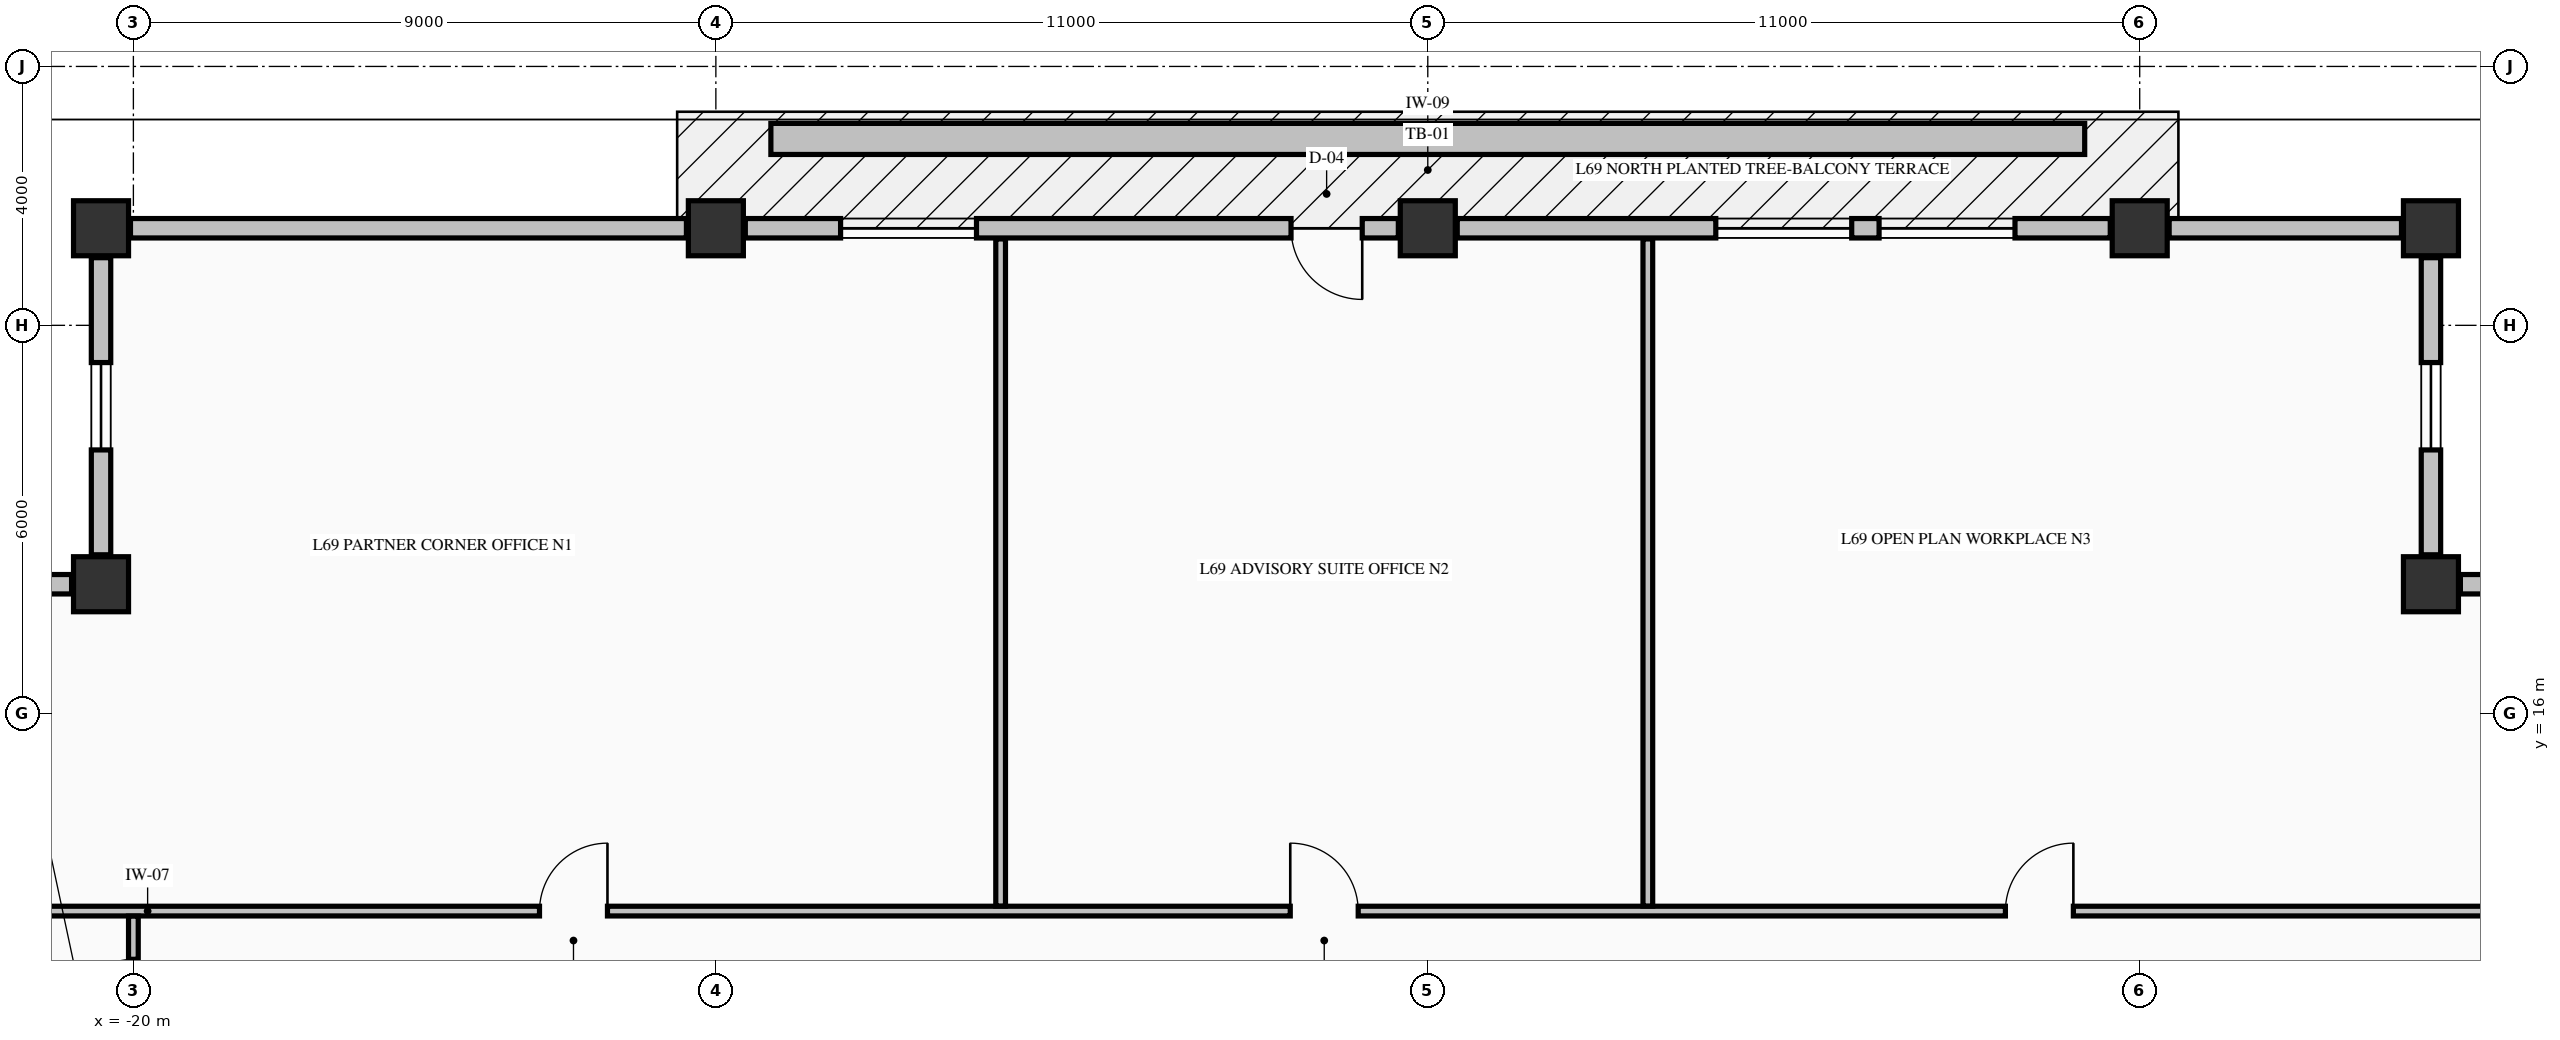
"""IFC4 building model, lengths in metres.
Left out: names, types, materials, properties, quantities, classifications, styles, units other than length and angle.
Written with IfcOpenShell. Run it as: python <this file> out.ifc"""

import sys

from ifc_helpers import new_model, si_unit, direction, frame, frame_2d, origin, origin_2d, place, context, subcontext, project, spatial, rectangle, extrude, element, fill, save


model = new_model("IFC4")
c1 = context("Model", 3, precision=1e-05, world=origin(), true_north=direction((0.0, 1.0)))
c2 = subcontext(c1, "Body", "Model", "MODEL_VIEW")
j1 = project(units=[si_unit("LENGTHUNIT", "METRE"), si_unit("PLANEANGLEUNIT", "RADIAN")], contexts=[c1])
p1 = place(None, origin())
s1 = spatial("IfcSite", under=j1, at=p1, CompositionType="ELEMENT")
p2 = place(p1, origin())
s2 = spatial("IfcBuilding", under=s1, at=p2, CompositionType="ELEMENT")
p3 = place(p2, frame((0.0, 0.0, 260.89)))
s3 = spatial("IfcBuildingStorey", under=s2, at=p3, CompositionType="ELEMENT", Elevation=260.89)
for number, where, z_axis, x_axis in (
    (1, (-20.5, 23.5, -0.25), (0.0, 0.0, 1.0), (1.0, 0.0, 0.0)),
    (2, (-11.0, 23.5, -0.25), (0.0, 0.0, 1.0), (1.0, 0.0, 0.0)),
    (3, (0.0, 23.5, -0.25), (0.0, 0.0, 1.0), (1.0, 0.0, 0.0)),
    (4, (11.0, 23.5, -0.25), (0.0, 0.0, 1.0), (1.0, 0.0, 0.0)),
    (5, (15.5, 23.5, -0.25), (0.0, 0.0, 1.0), (1.0, 0.0, 0.0)),
    (6, (15.5, 18.0, -0.25), (0.0, 0.0, 1.0), (1.0, 0.0, 0.0)),
    (7, (-20.5, 18.0, -0.25), (0.0, 0.0, 1.0), (1.0, 0.0, 0.0)),
):
    element("IfcColumn", number, at=place(p3, frame(where, z_axis=z_axis, x_axis=x_axis)), inside=s3, PredefinedType="COLUMN", context=c2, shape_type="SweptSolid", body=[
        extrude(rectangle(XDim=0.85, YDim=0.85, at=origin_2d()), origin(), (0.0, 0.0, 1.0), 3.23),
    ])
p4 = place(p3, frame((20.545, 18.0, 0.0), z_axis=(0.0, 0.0, 1.0), x_axis=(-1.0, 0.0, 0.0)))
e8 = element("IfcWall", 8, at=p4, inside=s3, PredefinedType="STANDARD", context=c2, shape_type="SweptSolid", body=[
    extrude(rectangle(XDim=4.59, YDim=0.3, at=frame_2d((2.295, 0.0))), origin(), (0.0, 0.0, 1.0), 2.372),
])
p5 = place(p4, frame((1.62, 0.0, 0.68)))
e9 = element("IfcOpeningElement", 9, at=p5, cuts=e8, PredefinedType="OPENING", context=c2, shape_type="SweptSolid", body=[
    extrude(rectangle(XDim=1.35, YDim=1.42, at=frame_2d((0.675, 0.71))), frame((0.0, 0.16, 0.0), z_axis=(0.0, -1.0, 0.0), x_axis=(1.0, 0.0, 0.0)), (0.0, 0.0, 1.0), 0.32),
])
p6 = place(p3, frame((15.5, 18.455, 0.0), z_axis=(0.0, 0.0, 1.0), x_axis=(0.0, 1.0, 0.0)))
e10 = element("IfcWall", 10, at=p6, inside=s3, PredefinedType="STANDARD", context=c2, shape_type="SweptSolid", body=[
    extrude(rectangle(XDim=4.59, YDim=0.3, at=frame_2d((2.295, 0.0))), origin(), (0.0, 0.0, 1.0), 2.372),
])
p7 = place(p6, frame((1.62, 0.0, 0.68)))
e11 = element("IfcOpeningElement", 11, at=p7, cuts=e10, PredefinedType="OPENING", context=c2, shape_type="SweptSolid", body=[
    extrude(rectangle(XDim=1.35, YDim=1.42, at=frame_2d((0.675, 0.71))), frame((0.0, 0.16, 0.0), z_axis=(0.0, -1.0, 0.0), x_axis=(1.0, 0.0, 0.0)), (0.0, 0.0, 1.0), 0.32),
])
p8 = place(p3, frame((-20.5, 23.045, 0.0), z_axis=(0.0, 0.0, 1.0), x_axis=(0.0, -1.0, 0.0)))
e12 = element("IfcWall", 12, at=p8, inside=s3, PredefinedType="STANDARD", context=c2, shape_type="SweptSolid", body=[
    extrude(rectangle(XDim=4.59, YDim=0.3, at=frame_2d((2.295, 0.0))), origin(), (0.0, 0.0, 1.0), 2.372),
])
p9 = place(p8, frame((1.62, 0.0, 0.68)))
e13 = element("IfcOpeningElement", 13, at=p9, cuts=e12, PredefinedType="OPENING", context=c2, shape_type="SweptSolid", body=[
    extrude(rectangle(XDim=1.35, YDim=1.42, at=frame_2d((0.675, 0.71))), frame((0.0, 0.16, 0.0), z_axis=(0.0, -1.0, 0.0), x_axis=(1.0, 0.0, 0.0)), (0.0, 0.0, 1.0), 0.32),
])
p10 = place(p3, frame((-20.955, 18.0, 0.0), z_axis=(0.0, 0.0, 1.0), x_axis=(-1.0, 0.0, 0.0)))
e14 = element("IfcWall", 14, at=p10, inside=s3, PredefinedType="STANDARD", context=c2, shape_type="SweptSolid", body=[
    extrude(rectangle(XDim=4.59, YDim=0.3, at=frame_2d((2.295, 0.0))), origin(), (0.0, 0.0, 1.0), 2.372),
])
p11 = place(p10, frame((1.62, 0.0, 0.68)))
e15 = element("IfcOpeningElement", 15, at=p11, cuts=e14, PredefinedType="OPENING", context=c2, shape_type="SweptSolid", body=[
    extrude(rectangle(XDim=1.35, YDim=1.42, at=frame_2d((0.675, 0.71))), frame((0.0, 0.16, 0.0), z_axis=(0.0, -1.0, 0.0), x_axis=(1.0, 0.0, 0.0)), (0.0, 0.0, 1.0), 0.32),
])
p12 = place(p3, frame((-11.455, 23.5, 0.0), z_axis=(0.0, 0.0, 1.0), x_axis=(-1.0, 0.0, 0.0)))
e16 = element("IfcWall", 16, at=p12, inside=s3, PredefinedType="STANDARD", context=c2, shape_type="SweptSolid", body=[
    extrude(rectangle(XDim=8.59, YDim=0.3, at=frame_2d((4.295, 0.0))), origin(), (0.0, 0.0, 1.0), 2.372),
])
p13 = place(p3, frame((-0.455, 23.5, 0.0), z_axis=(0.0, 0.0, 1.0), x_axis=(-1.0, 0.0, 0.0)))
e17 = element("IfcWall", 17, at=p13, inside=s3, PredefinedType="STANDARD", context=c2, shape_type="SweptSolid", body=[
    extrude(rectangle(XDim=10.09, YDim=0.3, at=frame_2d((5.045, 0.0))), origin(), (0.0, 0.0, 1.0), 2.372),
])
p14 = place(p13, frame((0.558, 0.0, 0.0)))
e18 = element("IfcOpeningElement", 18, at=p14, cuts=e17, PredefinedType="OPENING", context=c2, shape_type="SweptSolid", body=[
    extrude(rectangle(XDim=1.1, YDim=2.15, at=frame_2d((0.55, 1.075))), frame((0.0, 0.16, 0.0), z_axis=(0.0, -1.0, 0.0), x_axis=(1.0, 0.0, 0.0)), (0.0, 0.0, 1.0), 0.32),
])
p15 = place(p13, frame((6.518, 0.0, 0.7)))
e19 = element("IfcOpeningElement", 19, at=p15, cuts=e17, PredefinedType="OPENING", context=c2, shape_type="SweptSolid", body=[
    extrude(rectangle(XDim=2.1, YDim=1.5, at=frame_2d((1.05, 0.75))), frame((0.0, 0.16, 0.0), z_axis=(0.0, -1.0, 0.0), x_axis=(1.0, 0.0, 0.0)), (0.0, 0.0, 1.0), 0.32),
])
p16 = place(p3, frame((10.545, 23.5, 0.0), z_axis=(0.0, 0.0, 1.0), x_axis=(-1.0, 0.0, 0.0)))
e20 = element("IfcWall", 20, at=p16, inside=s3, PredefinedType="STANDARD", context=c2, shape_type="SweptSolid", body=[
    extrude(rectangle(XDim=10.09, YDim=0.3, at=frame_2d((5.045, 0.0))), origin(), (0.0, 0.0, 1.0), 2.372),
])
p17 = place(p16, frame((1.472, 0.0, 0.7)))
e21 = element("IfcOpeningElement", 21, at=p17, cuts=e20, PredefinedType="OPENING", context=c2, shape_type="SweptSolid", body=[
    extrude(rectangle(XDim=2.1, YDim=1.5, at=frame_2d((1.05, 0.75))), frame((0.0, 0.16, 0.0), z_axis=(0.0, -1.0, 0.0), x_axis=(1.0, 0.0, 0.0)), (0.0, 0.0, 1.0), 0.32),
])
p18 = place(p16, frame((3.995, 0.0, 0.7)))
e22 = element("IfcOpeningElement", 22, at=p18, cuts=e20, PredefinedType="OPENING", context=c2, shape_type="SweptSolid", body=[
    extrude(rectangle(XDim=2.1, YDim=1.5, at=frame_2d((1.05, 0.75))), frame((0.0, 0.16, 0.0), z_axis=(0.0, -1.0, 0.0), x_axis=(1.0, 0.0, 0.0)), (0.0, 0.0, 1.0), 0.32),
])
p19 = place(p3, frame((15.045, 23.5, 0.0), z_axis=(0.0, 0.0, 1.0), x_axis=(-1.0, 0.0, 0.0)))
e23 = element("IfcWall", 23, at=p19, inside=s3, PredefinedType="STANDARD", context=c2, shape_type="SweptSolid", body=[
    extrude(rectangle(XDim=3.59, YDim=0.3, at=frame_2d((1.795, 0.0))), origin(), (0.0, 0.0, 1.0), 2.372),
])
p20 = place(p3, frame((-25.835, 12.95, 0.0), z_axis=(0.0, 0.0, 1.0), x_axis=(1.0, 0.0, 0.0)))
e24 = element("IfcWall", 24, at=p20, inside=s3, PredefinedType="PARTITIONING", context=c2, shape_type="SweptSolid", body=[
    extrude(rectangle(XDim=45.91, YDim=0.15, at=frame_2d((22.955, 0.0))), origin(), (0.0, 0.0, 1.0), 2.98),
])
p21 = place(p20, frame((12.11, 0.0, 0.0)))
e25 = element("IfcOpeningElement", 25, at=p21, cuts=e24, PredefinedType="OPENING", context=c2, shape_type="SweptSolid", body=[
    extrude(rectangle(XDim=1.05, YDim=2.15, at=frame_2d((0.525, 1.075))), frame((0.0, 0.085, 0.0), z_axis=(0.0, -1.0, 0.0), x_axis=(1.0, 0.0, 0.0)), (0.0, 0.0, 1.0), 0.17),
])
p22 = place(p20, frame((23.71, 0.0, 0.0)))
e26 = element("IfcOpeningElement", 26, at=p22, cuts=e24, PredefinedType="OPENING", context=c2, shape_type="SweptSolid", body=[
    extrude(rectangle(XDim=1.05, YDim=2.15, at=frame_2d((0.525, 1.075))), frame((0.0, 0.085, 0.0), z_axis=(0.0, -1.0, 0.0), x_axis=(1.0, 0.0, 0.0)), (0.0, 0.0, 1.0), 0.17),
])
p23 = place(p20, frame((34.76, 0.0, 0.0)))
e27 = element("IfcOpeningElement", 27, at=p23, cuts=e24, PredefinedType="OPENING", context=c2, shape_type="SweptSolid", body=[
    extrude(rectangle(XDim=1.05, YDim=2.15, at=frame_2d((0.525, 1.075))), frame((0.0, 0.085, 0.0), z_axis=(0.0, -1.0, 0.0), x_axis=(1.0, 0.0, 0.0)), (0.0, 0.0, 1.0), 0.17),
])
p24 = place(p3, frame((-20.0, 10.856, 0.0), z_axis=(0.0, 0.0, 1.0), x_axis=(0.0, 1.0, 0.0)))
e28 = element("IfcWall", 28, at=p24, inside=s3, PredefinedType="PARTITIONING", context=c2, shape_type="SweptSolid", body=[
    extrude(rectangle(XDim=2.016, YDim=0.15, at=frame_2d((1.008, 0.0))), origin(), (0.0, 0.0, 1.0), 2.98),
])
p25 = place(p24, frame((0.399, 0.0, 0.0)))
e29 = element("IfcOpeningElement", 29, at=p25, cuts=e28, PredefinedType="OPENING", context=c2, shape_type="SweptSolid", body=[
    extrude(rectangle(XDim=0.95, YDim=2.15, at=frame_2d((0.475, 1.075))), frame((0.0, 0.085, 0.0), z_axis=(0.0, -1.0, 0.0), x_axis=(1.0, 0.0, 0.0)), (0.0, 0.0, 1.0), 0.17),
])
for number, where, z_axis, x_axis in (
    (30, (-6.6, 13.028, 0.0), (0.0, 0.0, 1.0), (0.0, 1.0, 0.0)),
    (31, (3.4, 13.028, 0.0), (0.0, 0.0, 1.0), (0.0, 1.0, 0.0)),
):
    element("IfcWall", number, at=place(p3, frame(where, z_axis=z_axis, x_axis=x_axis)), inside=s3, PredefinedType="PARTITIONING", context=c2, shape_type="SweptSolid", body=[
        extrude(rectangle(XDim=10.307, YDim=0.15, at=frame_2d((5.153, 0.0))), origin(), (0.0, 0.0, 1.0), 2.98),
    ])
p26 = place(p3, frame((-10.15, 24.88, -0.04), z_axis=(0.0, 0.0, 1.0), x_axis=(1.0, 0.0, 0.0)))
e32 = element("IfcWall", 32, at=p26, inside=s3, PredefinedType="PARAPET", context=c2, shape_type="SweptSolid", body=[
    extrude(rectangle(XDim=20.3, YDim=0.48, at=frame_2d((10.15, 0.0))), origin(), (0.0, 0.0, 1.0), 0.52),
])
p27 = place(p7, origin())
e33 = element("IfcWindow", 33, at=p27, inside=s3, PartitioningType="SINGLE_PANEL", PredefinedType="WINDOW", context=c2, shape_type="SweptSolid", body=[
    extrude(rectangle(XDim=1.35, YDim=1.42, at=frame_2d((0.675, 0.71))), frame((0.0, 0.03, 0.0), z_axis=(0.0, -1.0, 0.0), x_axis=(1.0, 0.0, 0.0)), (0.0, 0.0, 1.0), 0.06),
])
fill(e11, e33)
p28 = place(p9, origin())
e34 = element("IfcWindow", 34, at=p28, inside=s3, PartitioningType="SINGLE_PANEL", PredefinedType="WINDOW", context=c2, shape_type="SweptSolid", body=[
    extrude(rectangle(XDim=1.35, YDim=1.42, at=frame_2d((0.675, 0.71))), frame((0.0, 0.03, 0.0), z_axis=(0.0, -1.0, 0.0), x_axis=(1.0, 0.0, 0.0)), (0.0, 0.0, 1.0), 0.06),
])
fill(e13, e34)
p29 = place(p14, origin())
e35 = element("IfcDoor", 35, at=p29, inside=s3, OperationType="SINGLE_SWING_LEFT", PredefinedType="DOOR", context=c2, shape_type="SweptSolid", body=[
    extrude(rectangle(XDim=1.1, YDim=2.15, at=frame_2d((0.55, 1.075))), frame((0.0, 0.025, 0.0), z_axis=(0.0, -1.0, 0.0), x_axis=(1.0, 0.0, 0.0)), (0.0, 0.0, 1.0), 0.05),
])
fill(e18, e35)
p30 = place(p15, origin())
e36 = element("IfcWindow", 36, at=p30, inside=s3, PartitioningType="SINGLE_PANEL", PredefinedType="WINDOW", context=c2, shape_type="SweptSolid", body=[
    extrude(rectangle(XDim=2.1, YDim=1.5, at=frame_2d((1.05, 0.75))), frame((0.0, 0.03, 0.0), z_axis=(0.0, -1.0, 0.0), x_axis=(1.0, 0.0, 0.0)), (0.0, 0.0, 1.0), 0.06),
])
fill(e19, e36)
p31 = place(p17, origin())
e37 = element("IfcWindow", 37, at=p31, inside=s3, PartitioningType="SINGLE_PANEL", PredefinedType="WINDOW", context=c2, shape_type="SweptSolid", body=[
    extrude(rectangle(XDim=2.1, YDim=1.5, at=frame_2d((1.05, 0.75))), frame((0.0, 0.03, 0.0), z_axis=(0.0, -1.0, 0.0), x_axis=(1.0, 0.0, 0.0)), (0.0, 0.0, 1.0), 0.06),
])
fill(e21, e37)
p32 = place(p18, origin())
e38 = element("IfcWindow", 38, at=p32, inside=s3, PartitioningType="SINGLE_PANEL", PredefinedType="WINDOW", context=c2, shape_type="SweptSolid", body=[
    extrude(rectangle(XDim=2.1, YDim=1.5, at=frame_2d((1.05, 0.75))), frame((0.0, 0.03, 0.0), z_axis=(0.0, -1.0, 0.0), x_axis=(1.0, 0.0, 0.0)), (0.0, 0.0, 1.0), 0.06),
])
fill(e22, e38)
p33 = place(p21, origin())
e39 = element("IfcDoor", 39, at=p33, inside=s3, OperationType="SINGLE_SWING_RIGHT", PredefinedType="DOOR", context=c2, shape_type="SweptSolid", body=[
    extrude(rectangle(XDim=1.05, YDim=2.15, at=frame_2d((0.525, 1.075))), frame((0.0, 0.025, 0.0), z_axis=(0.0, -1.0, 0.0), x_axis=(1.0, 0.0, 0.0)), (0.0, 0.0, 1.0), 0.05),
])
fill(e25, e39)
p34 = place(p22, origin())
e40 = element("IfcDoor", 40, at=p34, inside=s3, OperationType="SINGLE_SWING_LEFT", PredefinedType="DOOR", context=c2, shape_type="SweptSolid", body=[
    extrude(rectangle(XDim=1.05, YDim=2.15, at=frame_2d((0.525, 1.075))), frame((0.0, 0.025, 0.0), z_axis=(0.0, -1.0, 0.0), x_axis=(1.0, 0.0, 0.0)), (0.0, 0.0, 1.0), 0.05),
])
fill(e26, e40)
p35 = place(p23, origin())
e41 = element("IfcDoor", 41, at=p35, inside=s3, OperationType="SINGLE_SWING_RIGHT", PredefinedType="DOOR", context=c2, shape_type="SweptSolid", body=[
    extrude(rectangle(XDim=1.05, YDim=2.15, at=frame_2d((0.525, 1.075))), frame((0.0, 0.025, 0.0), z_axis=(0.0, -1.0, 0.0), x_axis=(1.0, 0.0, 0.0)), (0.0, 0.0, 1.0), 0.05),
])
fill(e27, e41)
p36 = place(p25, origin())
e42 = element("IfcDoor", 42, at=p36, inside=s3, OperationType="SINGLE_SWING_LEFT", PredefinedType="DOOR", context=c2, shape_type="SweptSolid", body=[
    extrude(rectangle(XDim=0.95, YDim=2.15, at=frame_2d((0.475, 1.075))), frame((0.0, 0.025, 0.0), z_axis=(0.0, -1.0, 0.0), x_axis=(1.0, 0.0, 0.0)), (0.0, 0.0, 1.0), 0.05),
])
fill(e29, e42)
save(model, sys.argv[1])
